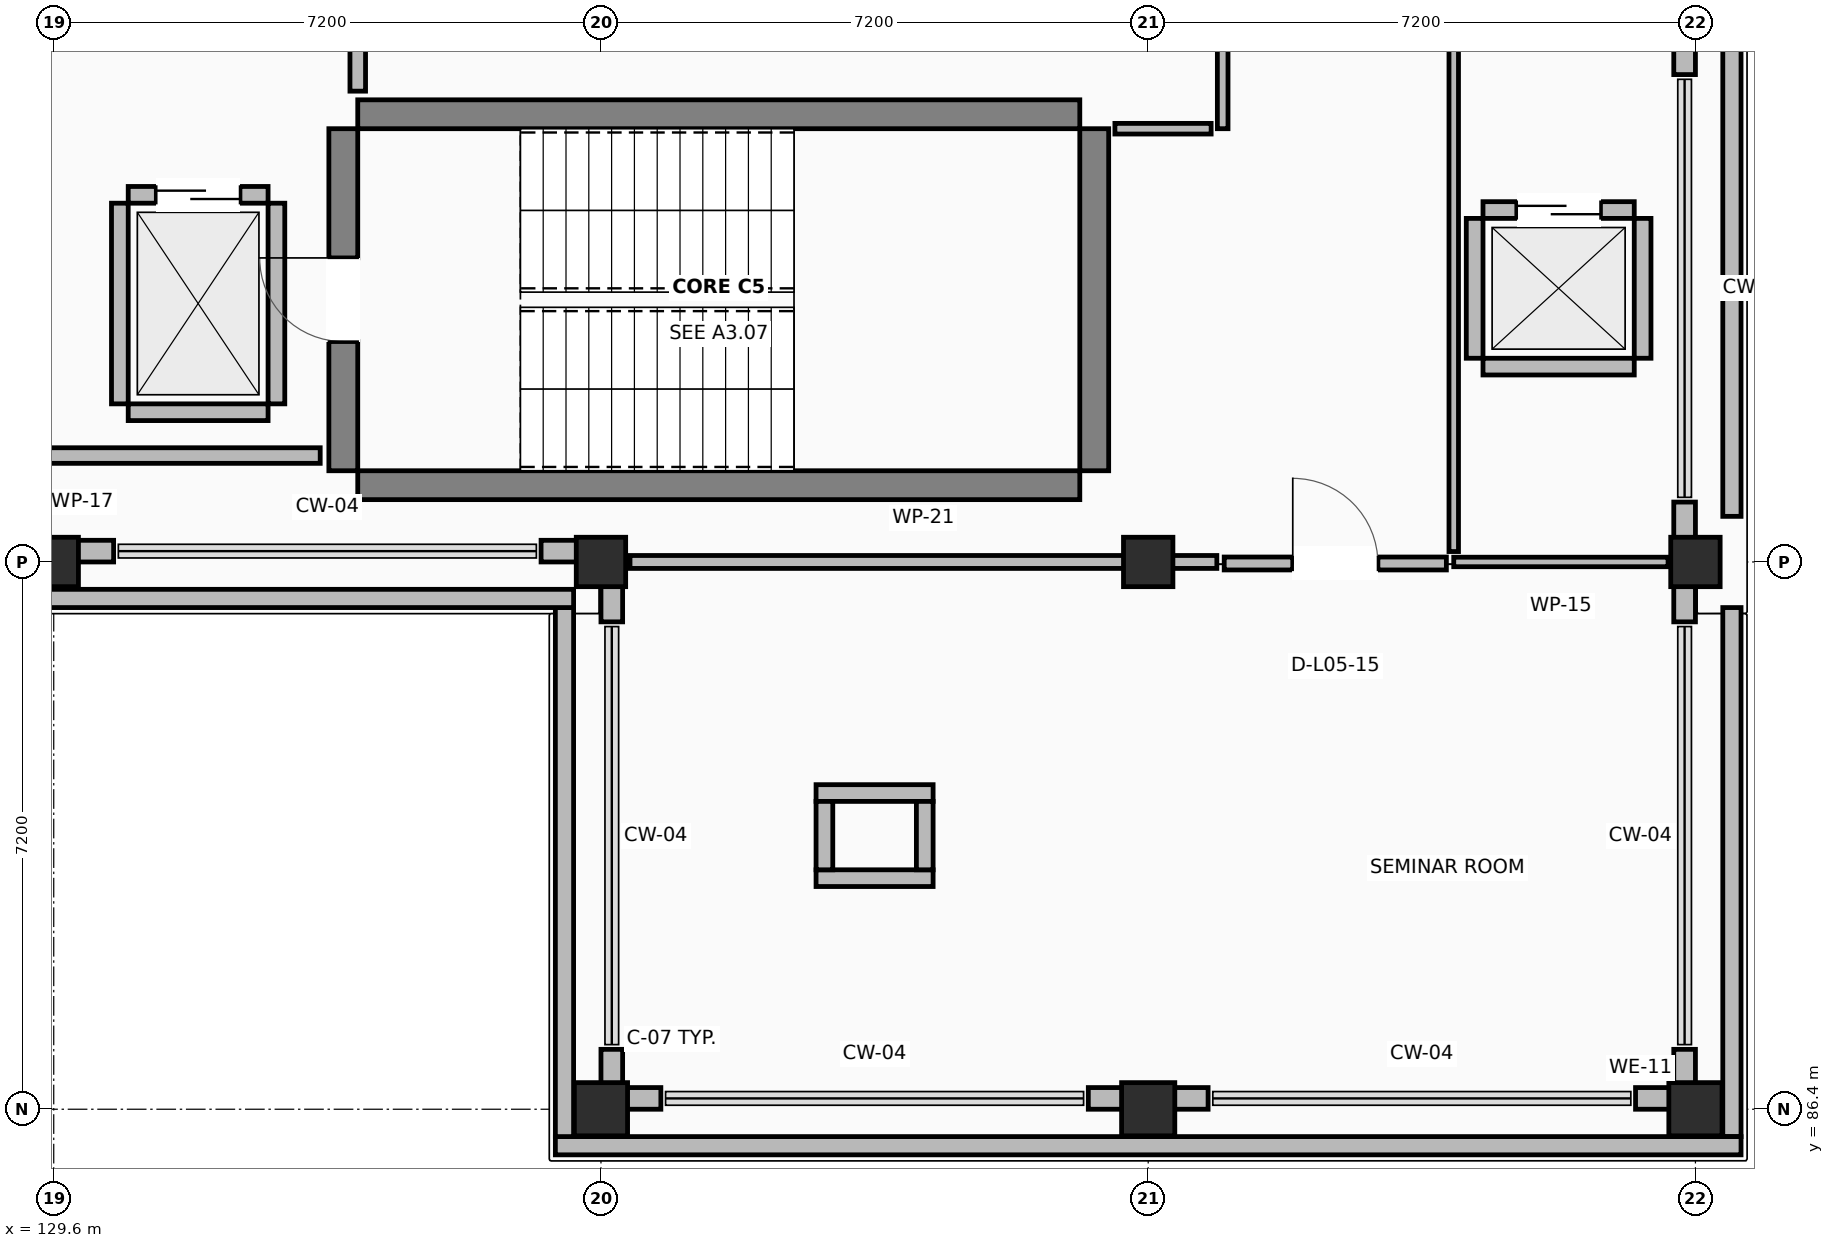
"""IFC4 building model, lengths in metres.
Left out: names, types, materials, properties, quantities, classifications, styles, units other than length and angle.
Written with IfcOpenShell. Run it as: python <this file> out.ifc"""

import sys

from ifc_helpers import new_model, si_unit, direction, frame, frame_2d, origin, origin_2d, place, context, subcontext, project, spatial, rectangle, extrude, element, fill, save


model = new_model("IFC4")
c1 = context("Model", 3, precision=1e-05, world=origin(), true_north=direction((0.0, 1.0)))
c2 = subcontext(c1, "Body", "Model", "MODEL_VIEW")
j1 = project(units=[si_unit("LENGTHUNIT", "METRE"), si_unit("PLANEANGLEUNIT", "RADIAN")], contexts=[c1])
p1 = place(None, origin())
s1 = spatial("IfcSite", under=j1, at=p1, CompositionType="ELEMENT")
p2 = place(p1, origin())
s2 = spatial("IfcBuilding", under=s1, at=p2, CompositionType="ELEMENT")
p3 = place(p2, frame((0.0, 0.0, 22.5)))
s3 = spatial("IfcBuildingStorey", under=s2, at=p3, CompositionType="ELEMENT", Elevation=22.5)
p4 = place(p3, frame((129.6, 93.6, 0.0), z_axis=(0.0, 0.0, 1.0), x_axis=(1.0, 0.0, 0.0)))
e1 = element("IfcColumn", 1, at=p4, inside=s3, PredefinedType="COLUMN", context=c2, shape_type="SweptSolid", body=[
    extrude(rectangle(XDim=0.65, YDim=0.65, at=origin_2d()), origin(), (0.0, 0.0, 1.0), 4.22),
])
p5 = place(p3, frame((136.8, 86.4, 0.0), z_axis=(0.0, 0.0, 1.0), x_axis=(1.0, 0.0, 0.0)))
e2 = element("IfcColumn", 2, at=p5, inside=s3, PredefinedType="COLUMN", context=c2, shape_type="SweptSolid", body=[
    extrude(rectangle(XDim=0.7, YDim=0.7, at=origin_2d()), origin(), (0.0, 0.0, 1.0), 4.22),
])
p6 = place(p3, frame((136.8, 93.6, 0.0), z_axis=(0.0, 0.0, 1.0), x_axis=(1.0, 0.0, 0.0)))
e3 = element("IfcColumn", 3, at=p6, inside=s3, PredefinedType="COLUMN", context=c2, shape_type="SweptSolid", body=[
    extrude(rectangle(XDim=0.65, YDim=0.65, at=origin_2d()), origin(), (0.0, 0.0, 1.0), 4.22),
])
p7 = place(p3, frame((144.0, 86.4, 0.0), z_axis=(0.0, 0.0, 1.0), x_axis=(1.0, 0.0, 0.0)))
e4 = element("IfcColumn", 4, at=p7, inside=s3, PredefinedType="COLUMN", context=c2, shape_type="SweptSolid", body=[
    extrude(rectangle(XDim=0.7, YDim=0.7, at=origin_2d()), origin(), (0.0, 0.0, 1.0), 4.22),
])
p8 = place(p3, frame((144.0, 93.6, 0.0), z_axis=(0.0, 0.0, 1.0), x_axis=(1.0, 0.0, 0.0)))
e5 = element("IfcColumn", 5, at=p8, inside=s3, PredefinedType="COLUMN", context=c2, shape_type="SweptSolid", body=[
    extrude(rectangle(XDim=0.65, YDim=0.65, at=origin_2d()), origin(), (0.0, 0.0, 1.0), 4.22),
])
p9 = place(p3, frame((151.2, 86.4, 0.0), z_axis=(0.0, 0.0, 1.0), x_axis=(1.0, 0.0, 0.0)))
e6 = element("IfcColumn", 6, at=p9, inside=s3, PredefinedType="COLUMN", context=c2, shape_type="SweptSolid", body=[
    extrude(rectangle(XDim=0.7, YDim=0.7, at=origin_2d()), origin(), (0.0, 0.0, 1.0), 4.22),
])
p10 = place(p3, frame((151.2, 93.6, 0.0), z_axis=(0.0, 0.0, 1.0), x_axis=(1.0, 0.0, 0.0)))
e7 = element("IfcColumn", 7, at=p10, inside=s3, PredefinedType="COLUMN", context=c2, shape_type="SweptSolid", body=[
    extrude(rectangle(XDim=0.65, YDim=0.65, at=origin_2d()), origin(), (0.0, 0.0, 1.0), 4.22),
])
for number, where, z_axis, x_axis in (
    (8, (133.6, 94.61, 0.0), (0.0, 0.0, 1.0), (1.0, 0.0, 0.0)),
    (9, (133.6, 99.49, 0.0), (0.0, 0.0, 1.0), (1.0, 0.0, 0.0)),
):
    element("IfcWall", number, at=place(p3, frame(where, z_axis=z_axis, x_axis=x_axis)), inside=s3, PredefinedType="SHEAR", context=c2, shape_type="SweptSolid", body=[
        extrude(rectangle(XDim=9.5, YDim=0.38, at=frame_2d((4.75, 0.0))), origin(), (0.0, 0.0, 1.0), 4.22),
    ])
p11 = place(p3, frame((133.41, 94.8, 0.0), z_axis=(0.0, 0.0, 1.0), x_axis=(0.0, 1.0, 0.0)))
e10 = element("IfcWall", 10, at=p11, inside=s3, PredefinedType="SHEAR", context=c2, shape_type="SweptSolid", body=[
    extrude(rectangle(XDim=4.5, YDim=0.38, at=frame_2d((2.25, 0.0))), origin(), (0.0, 0.0, 1.0), 4.22),
])
p12 = place(p11, frame((1.7, 0.0, 0.0)))
e11 = element("IfcOpeningElement", 11, at=p12, cuts=e10, PredefinedType="OPENING", context=c2, shape_type="SweptSolid", body=[
    extrude(rectangle(XDim=1.1, YDim=2.15, at=frame_2d((0.55, 1.075))), frame((0.0, 0.2, 0.0), z_axis=(0.0, -1.0, 0.0), x_axis=(1.0, 0.0, 0.0)), (0.0, 0.0, 1.0), 0.4),
])
p13 = place(p3, frame((143.29, 94.8, 0.0), z_axis=(0.0, 0.0, 1.0), x_axis=(0.0, 1.0, 0.0)))
e12 = element("IfcWall", 12, at=p13, inside=s3, PredefinedType="SHEAR", context=c2, shape_type="SweptSolid", body=[
    extrude(rectangle(XDim=4.5, YDim=0.38, at=frame_2d((2.25, 0.0))), origin(), (0.0, 0.0, 1.0), 4.22),
])
p14 = place(p3, frame((151.058, 86.685, 0.0), z_axis=(0.0, 0.0, 1.0), x_axis=(0.0, 1.0, 0.0)))
e13 = element("IfcWall", 13, at=p14, inside=s3, PredefinedType="STANDARD", context=c2, shape_type="SweptSolid", body=[
    extrude(rectangle(XDim=0.503, YDim=0.285, at=frame_2d((0.251, 0.0))), origin(), (0.0, 0.0, 1.0), 3.26),
])
p15 = place(p3, frame((151.058, 92.812, 0.0), z_axis=(0.0, 0.0, 1.0), x_axis=(0.0, 1.0, 0.0)))
e14 = element("IfcWall", 14, at=p15, inside=s3, PredefinedType="STANDARD", context=c2, shape_type="SweptSolid", body=[
    extrude(rectangle(XDim=0.788, YDim=0.285, at=frame_2d((0.394, 0.0))), origin(), (0.0, 0.0, 1.0), 3.26),
])
p16 = place(p3, frame((151.058, 93.6, 0.0), z_axis=(0.0, 0.0, 1.0), x_axis=(0.0, 1.0, 0.0)))
e15 = element("IfcWall", 15, at=p16, inside=s3, PredefinedType="STANDARD", context=c2, shape_type="SweptSolid", body=[
    extrude(rectangle(XDim=0.788, YDim=0.285, at=frame_2d((0.394, 0.0))), origin(), (0.0, 0.0, 1.0), 3.26),
])
for number, where, z_axis, x_axis in (
    (16, (151.058, 100.012, 0.0), (0.0, 0.0, 1.0), (0.0, 1.0, 0.0)),
    (17, (128.812, 93.742, 0.0), (0.0, 0.0, 1.0), (1.0, 0.0, 0.0)),
):
    element("IfcWall", number, at=place(p3, frame(where, z_axis=z_axis, x_axis=x_axis)), inside=s3, PredefinedType="STANDARD", context=c2, shape_type="SweptSolid", body=[
        extrude(rectangle(XDim=1.576, YDim=0.285, at=frame_2d((0.788, 0.0))), origin(), (0.0, 0.0, 1.0), 3.26),
    ])
p17 = place(p3, frame((136.012, 93.742, 0.0), z_axis=(0.0, 0.0, 1.0), x_axis=(1.0, 0.0, 0.0)))
e18 = element("IfcWall", 18, at=p17, inside=s3, PredefinedType="STANDARD", context=c2, shape_type="SweptSolid", body=[
    extrude(rectangle(XDim=0.788, YDim=0.285, at=frame_2d((0.394, 0.0))), origin(), (0.0, 0.0, 1.0), 3.26),
])
p18 = place(p3, frame((136.942, 93.885, 0.0), z_axis=(0.0, 0.0, 1.0), x_axis=(0.0, -1.0, 0.0)))
e19 = element("IfcWall", 19, at=p18, inside=s3, PredefinedType="STANDARD", context=c2, shape_type="SweptSolid", body=[
    extrude(rectangle(XDim=1.073, YDim=0.285, at=frame_2d((0.537, 0.0))), origin(), (0.0, 0.0, 1.0), 3.26),
])
p19 = place(p3, frame((136.942, 87.188, 0.0), z_axis=(0.0, 0.0, 1.0), x_axis=(0.0, -1.0, 0.0)))
e20 = element("IfcWall", 20, at=p19, inside=s3, PredefinedType="STANDARD", context=c2, shape_type="SweptSolid", body=[
    extrude(rectangle(XDim=0.503, YDim=0.285, at=frame_2d((0.251, 0.0))), origin(), (0.0, 0.0, 1.0), 3.26),
])
p20 = place(p3, frame((136.8, 86.542, 0.0), z_axis=(0.0, 0.0, 1.0), x_axis=(1.0, 0.0, 0.0)))
e21 = element("IfcWall", 21, at=p20, inside=s3, PredefinedType="STANDARD", context=c2, shape_type="SweptSolid", body=[
    extrude(rectangle(XDim=0.788, YDim=0.285, at=frame_2d((0.394, 0.0))), origin(), (0.0, 0.0, 1.0), 3.26),
])
p21 = place(p3, frame((143.212, 86.542, 0.0), z_axis=(0.0, 0.0, 1.0), x_axis=(1.0, 0.0, 0.0)))
e22 = element("IfcWall", 22, at=p21, inside=s3, PredefinedType="STANDARD", context=c2, shape_type="SweptSolid", body=[
    extrude(rectangle(XDim=1.576, YDim=0.285, at=frame_2d((0.788, 0.0))), origin(), (0.0, 0.0, 1.0), 3.26),
])
p22 = place(p3, frame((150.412, 86.542, 0.0), z_axis=(0.0, 0.0, 1.0), x_axis=(1.0, 0.0, 0.0)))
e23 = element("IfcWall", 23, at=p22, inside=s3, PredefinedType="STANDARD", context=c2, shape_type="SweptSolid", body=[
    extrude(rectangle(XDim=0.788, YDim=0.285, at=frame_2d((0.394, 0.0))), origin(), (0.0, 0.0, 1.0), 3.26),
])
p23 = place(p3, frame((151.68, 115.56, 0.0), z_axis=(0.0, 0.0, 1.0), x_axis=(0.0, -1.0, 0.0)))
e24 = element("IfcWall", 24, at=p23, inside=s3, PredefinedType="PARAPET", context=c2, shape_type="SweptSolid", body=[
    extrude(rectangle(XDim=21.36, YDim=0.24, at=frame_2d((10.68, 0.0))), origin(), (0.0, 0.0, 1.0), 1.12),
])
p24 = place(p3, frame((151.68, 93.0, 0.0), z_axis=(0.0, 0.0, 1.0), x_axis=(0.0, -1.0, 0.0)))
e25 = element("IfcWall", 25, at=p24, inside=s3, PredefinedType="PARAPET", context=c2, shape_type="SweptSolid", body=[
    extrude(rectangle(XDim=6.96, YDim=0.24, at=frame_2d((3.48, 0.0))), origin(), (0.0, 0.0, 1.0), 1.12),
])
p25 = place(p3, frame((151.8, 85.92, 0.0), z_axis=(0.0, 0.0, 1.0), x_axis=(-1.0, 0.0, 0.0)))
e26 = element("IfcWall", 26, at=p25, inside=s3, PredefinedType="PARAPET", context=c2, shape_type="SweptSolid", body=[
    extrude(rectangle(XDim=15.6, YDim=0.24, at=frame_2d((7.8, 0.0))), origin(), (0.0, 0.0, 1.0), 1.12),
])
p26 = place(p3, frame((136.32, 86.04, 0.0), z_axis=(0.0, 0.0, 1.0), x_axis=(0.0, 1.0, 0.0)))
e27 = element("IfcWall", 27, at=p26, inside=s3, PredefinedType="PARAPET", context=c2, shape_type="SweptSolid", body=[
    extrude(rectangle(XDim=6.96, YDim=0.24, at=frame_2d((3.48, 0.0))), origin(), (0.0, 0.0, 1.0), 1.12),
])
p27 = place(p3, frame((136.44, 93.12, 0.0), z_axis=(0.0, 0.0, 1.0), x_axis=(-1.0, 0.0, 0.0)))
e28 = element("IfcWall", 28, at=p27, inside=s3, PredefinedType="PARAPET", context=c2, shape_type="SweptSolid", body=[
    extrude(rectangle(XDim=57.84, YDim=0.24, at=frame_2d((28.92, 0.0))), origin(), (0.0, 0.0, 1.0), 1.12),
])
p28 = place(p3, frame((130.58, 95.57, 0.0), z_axis=(0.0, 0.0, 1.0), x_axis=(1.0, 0.0, 0.0)))
e29 = element("IfcWall", 29, at=p28, inside=s3, PredefinedType="STANDARD", context=c2, shape_type="SweptSolid", body=[
    extrude(rectangle(XDim=1.84, YDim=0.22, at=frame_2d((0.92, 0.0))), origin(), (0.0, 0.0, 1.0), 3.26),
])
p29 = place(p3, frame((130.58, 98.43, 0.0), z_axis=(0.0, 0.0, 1.0), x_axis=(1.0, 0.0, 0.0)))
e30 = element("IfcWall", 30, at=p29, inside=s3, PredefinedType="STANDARD", context=c2, shape_type="SweptSolid", body=[
    extrude(rectangle(XDim=1.84, YDim=0.22, at=frame_2d((0.92, 0.0))), origin(), (0.0, 0.0, 1.0), 3.26),
])
p30 = place(p29, frame((0.37, 0.0, 0.0)))
e31 = element("IfcOpeningElement", 31, at=p30, cuts=e30, PredefinedType="OPENING", context=c2, shape_type="SweptSolid", body=[
    extrude(rectangle(XDim=1.1, YDim=2.15, at=frame_2d((0.55, 1.075))), frame((0.0, 0.12, 0.0), z_axis=(0.0, -1.0, 0.0), x_axis=(1.0, 0.0, 0.0)), (0.0, 0.0, 1.0), 0.24),
])
for number, where, z_axis, x_axis in (
    (32, (130.47, 95.68, 0.0), (0.0, 0.0, 1.0), (0.0, 1.0, 0.0)),
    (33, (132.53, 95.68, 0.0), (0.0, 0.0, 1.0), (0.0, 1.0, 0.0)),
):
    element("IfcWall", number, at=place(p3, frame(where, z_axis=z_axis, x_axis=x_axis)), inside=s3, PredefinedType="STANDARD", context=c2, shape_type="SweptSolid", body=[
        extrude(rectangle(XDim=2.64, YDim=0.22, at=frame_2d((1.32, 0.0))), origin(), (0.0, 0.0, 1.0), 3.26),
    ])
p31 = place(p3, frame((148.405, 96.17, 0.0), z_axis=(0.0, 0.0, 1.0), x_axis=(1.0, 0.0, 0.0)))
e34 = element("IfcWall", 34, at=p31, inside=s3, PredefinedType="STANDARD", context=c2, shape_type="SweptSolid", body=[
    extrude(rectangle(XDim=1.99, YDim=0.22, at=frame_2d((0.995, 0.0))), origin(), (0.0, 0.0, 1.0), 3.26),
])
p32 = place(p3, frame((148.405, 98.23, 0.0), z_axis=(0.0, 0.0, 1.0), x_axis=(1.0, 0.0, 0.0)))
e35 = element("IfcWall", 35, at=p32, inside=s3, PredefinedType="STANDARD", context=c2, shape_type="SweptSolid", body=[
    extrude(rectangle(XDim=1.99, YDim=0.22, at=frame_2d((0.995, 0.0))), origin(), (0.0, 0.0, 1.0), 3.26),
])
p33 = place(p32, frame((0.445, 0.0, 0.0)))
e36 = element("IfcOpeningElement", 36, at=p33, cuts=e35, PredefinedType="OPENING", context=c2, shape_type="SweptSolid", body=[
    extrude(rectangle(XDim=1.1, YDim=2.15, at=frame_2d((0.55, 1.075))), frame((0.0, 0.12, 0.0), z_axis=(0.0, -1.0, 0.0), x_axis=(1.0, 0.0, 0.0)), (0.0, 0.0, 1.0), 0.24),
])
for number, where, z_axis, x_axis in (
    (37, (148.295, 96.28, 0.0), (0.0, 0.0, 1.0), (0.0, 1.0, 0.0)),
    (38, (150.505, 96.28, 0.0), (0.0, 0.0, 1.0), (0.0, 1.0, 0.0)),
):
    element("IfcWall", number, at=place(p3, frame(where, z_axis=z_axis, x_axis=x_axis)), inside=s3, PredefinedType="STANDARD", context=c2, shape_type="SweptSolid", body=[
        extrude(rectangle(XDim=1.84, YDim=0.22, at=frame_2d((0.92, 0.0))), origin(), (0.0, 0.0, 1.0), 3.26),
    ])
for number, where, z_axis, x_axis in (
    (39, (139.63, 89.44, 0.0), (0.0, 0.0, 1.0), (1.0, 0.0, 0.0)),
    (40, (139.63, 90.56, 0.0), (0.0, 0.0, 1.0), (1.0, 0.0, 0.0)),
):
    element("IfcWall", number, at=place(p3, frame(where, z_axis=z_axis, x_axis=x_axis)), inside=s3, PredefinedType="STANDARD", context=c2, shape_type="SweptSolid", body=[
        extrude(rectangle(XDim=1.54, YDim=0.22, at=frame_2d((0.77, 0.0))), origin(), (0.0, 0.0, 1.0), 3.26),
    ])
for number, where, z_axis, x_axis in (
    (41, (139.74, 89.55, 0.0), (0.0, 0.0, 1.0), (0.0, 1.0, 0.0)),
    (42, (141.06, 89.55, 0.0), (0.0, 0.0, 1.0), (0.0, 1.0, 0.0)),
):
    element("IfcWall", number, at=place(p3, frame(where, z_axis=z_axis, x_axis=x_axis)), inside=s3, PredefinedType="STANDARD", context=c2, shape_type="SweptSolid", body=[
        extrude(rectangle(XDim=0.9, YDim=0.22, at=frame_2d((0.45, 0.0))), origin(), (0.0, 0.0, 1.0), 3.26),
    ])
p34 = place(p3, frame((133.6, 103.783, 0.0), z_axis=(0.0, 0.0, 1.0), x_axis=(0.0, -1.0, 0.0)))
e43 = element("IfcWall", 43, at=p34, inside=s3, PredefinedType="PARTITIONING", context=c2, shape_type="SweptSolid", body=[
    extrude(rectangle(XDim=3.989, YDim=0.205, at=frame_2d((1.995, 0.0))), origin(), (0.0, 0.0, 1.0), 3.26),
])
p35 = place(p3, frame((133.106, 95.0, 0.0), z_axis=(0.0, 0.0, 1.0), x_axis=(-1.0, 0.0, 0.0)))
e44 = element("IfcWall", 44, at=p35, inside=s3, PredefinedType="PARTITIONING", context=c2, shape_type="SweptSolid", body=[
    extrude(rectangle(XDim=3.706, YDim=0.205, at=frame_2d((1.853, 0.0))), origin(), (0.0, 0.0, 1.0), 3.26),
])
p36 = place(p3, frame((144.98, 103.828, 0.0), z_axis=(0.0, 0.0, 1.0), x_axis=(0.0, -1.0, 0.0)))
e45 = element("IfcWall", 45, at=p36, inside=s3, PredefinedType="PARTITIONING", context=c2, shape_type="SweptSolid", body=[
    extrude(rectangle(XDim=4.528, YDim=0.14, at=frame_2d((2.264, 0.0))), origin(), (0.0, 0.0, 1.0), 3.26),
])
p37 = place(p3, frame((144.828, 99.3, 0.0), z_axis=(0.0, 0.0, 1.0), x_axis=(-1.0, 0.0, 0.0)))
e46 = element("IfcWall", 46, at=p37, inside=s3, PredefinedType="PARTITIONING", context=c2, shape_type="SweptSolid", body=[
    extrude(rectangle(XDim=1.266, YDim=0.14, at=frame_2d((0.633, 0.0))), origin(), (0.0, 0.0, 1.0), 3.26),
])
p38 = place(p3, frame((150.84, 93.6, 0.0), z_axis=(0.0, 0.0, 1.0), x_axis=(-1.0, 0.0, 0.0)))
e47 = element("IfcWall", 47, at=p38, inside=s3, PredefinedType="PARTITIONING", context=c2, shape_type="SweptSolid", body=[
    extrude(rectangle(XDim=2.82, YDim=0.125, at=frame_2d((1.41, 0.0))), origin(), (0.0, 0.0, 1.0), 3.26),
])
p39 = place(p3, frame((148.02, 93.737, 0.0), z_axis=(0.0, 0.0, 1.0), x_axis=(0.0, 1.0, 0.0)))
e48 = element("IfcWall", 48, at=p39, inside=s3, PredefinedType="PARTITIONING", context=c2, shape_type="SweptSolid", body=[
    extrude(rectangle(XDim=10.106, YDim=0.125, at=frame_2d((5.053, 0.0))), origin(), (0.0, 0.0, 1.0), 3.26),
])
p40 = place(p3, frame((145.0, 93.58, 0.0), z_axis=(0.0, 0.0, 1.0), x_axis=(1.0, 0.0, 0.0)))
e49 = element("IfcWall", 49, at=p40, inside=s3, PredefinedType="PARTITIONING", context=c2, shape_type="SweptSolid", body=[
    extrude(rectangle(XDim=2.923, YDim=0.17, at=frame_2d((1.461, 0.0))), origin(), (0.0, 0.0, 1.0), 3.26),
])
p41 = place(p40, frame((0.902, 0.0, 0.0)))
e50 = element("IfcOpeningElement", 50, at=p41, cuts=e49, PredefinedType="OPENING", context=c2, shape_type="SweptSolid", body=[
    extrude(rectangle(XDim=1.12, YDim=2.15, at=frame_2d((0.56, 1.075))), frame((0.0, 0.095, 0.0), z_axis=(0.0, -1.0, 0.0), x_axis=(1.0, 0.0, 0.0)), (0.0, 0.0, 1.0), 0.19),
])
p42 = place(p3, frame((137.182, 93.6, 0.0), z_axis=(0.0, 0.0, 1.0), x_axis=(1.0, 0.0, 0.0)))
e51 = element("IfcWall", 51, at=p42, inside=s3, PredefinedType="PARTITIONING", context=c2, shape_type="SweptSolid", body=[
    extrude(rectangle(XDim=7.721, YDim=0.17, at=frame_2d((3.861, 0.0))), origin(), (0.0, 0.0, 1.0), 3.26),
])
p43 = place(p12, origin())
e52 = element("IfcDoor", 52, at=p43, inside=s3, OperationType="SINGLE_SWING_RIGHT", PredefinedType="DOOR", context=c2, shape_type="SweptSolid", body=[
    extrude(rectangle(XDim=1.1, YDim=2.15, at=frame_2d((0.55, 1.075))), frame((0.0, 0.025, 0.0), z_axis=(0.0, -1.0, 0.0), x_axis=(1.0, 0.0, 0.0)), (0.0, 0.0, 1.0), 0.05),
])
fill(e11, e52)
p44 = place(p30, origin())
e53 = element("IfcDoor", 53, at=p44, inside=s3, OperationType="SLIDING_TO_RIGHT", PredefinedType="DOOR", context=c2, shape_type="SweptSolid", body=[
    extrude(rectangle(XDim=1.1, YDim=2.15, at=frame_2d((0.55, 1.075))), frame((0.0, 0.025, 0.0), z_axis=(0.0, -1.0, 0.0), x_axis=(1.0, 0.0, 0.0)), (0.0, 0.0, 1.0), 0.05),
])
fill(e31, e53)
p45 = place(p33, origin())
e54 = element("IfcDoor", 54, at=p45, inside=s3, OperationType="SLIDING_TO_RIGHT", PredefinedType="DOOR", context=c2, shape_type="SweptSolid", body=[
    extrude(rectangle(XDim=1.1, YDim=2.15, at=frame_2d((0.55, 1.075))), frame((0.0, 0.025, 0.0), z_axis=(0.0, -1.0, 0.0), x_axis=(1.0, 0.0, 0.0)), (0.0, 0.0, 1.0), 0.05),
])
fill(e36, e54)
p46 = place(p41, origin())
e55 = element("IfcDoor", 55, at=p46, inside=s3, OperationType="SINGLE_SWING_LEFT", PredefinedType="DOOR", context=c2, shape_type="SweptSolid", body=[
    extrude(rectangle(XDim=1.12, YDim=2.15, at=frame_2d((0.56, 1.075))), frame((0.0, 0.025, 0.0), z_axis=(0.0, -1.0, 0.0), x_axis=(1.0, 0.0, 0.0)), (0.0, 0.0, 1.0), 0.05),
])
fill(e50, e55)
save(model, sys.argv[1])
